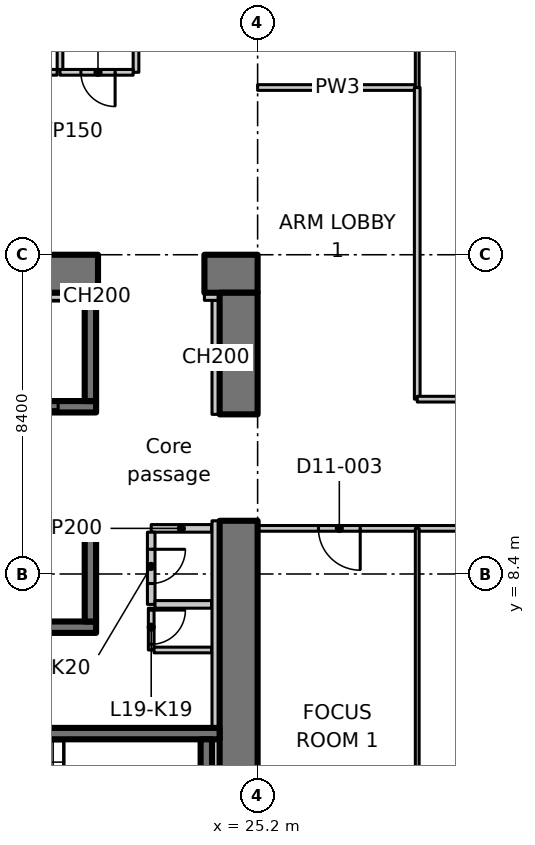
"""IFC4 building model, lengths in metres.
Left out: names, types, materials, properties, quantities, classifications, styles, units other than length and angle.
Written with IfcOpenShell. Run it as: python <this file> out.ifc"""

import sys

from ifc_helpers import new_model, si_unit, direction, frame, frame_2d, origin, place, context, subcontext, project, spatial, polyline, rectangle, outline, extrude, element, fill, save


model = new_model("IFC4")
c1 = context("Model", 3, precision=1e-05, world=origin(), true_north=direction((0.0, 1.0)))
c2 = subcontext(c1, "Body", "Model", "MODEL_VIEW")
j1 = project(units=[si_unit("LENGTHUNIT", "METRE"), si_unit("PLANEANGLEUNIT", "RADIAN")], contexts=[c1])
p1 = place(None, origin())
s1 = spatial("IfcSite", under=j1, at=p1, CompositionType="ELEMENT")
p2 = place(p1, origin())
s2 = spatial("IfcBuilding", under=s1, at=p2, CompositionType="ELEMENT")
p3 = place(p2, frame((0.0, 0.0, 83.3)))
s3 = spatial("IfcBuildingStorey", under=s2, at=p3, CompositionType="ELEMENT", Elevation=83.3)
p4 = place(p3, frame((-1.1, 16.3, 0.0), z_axis=(0.0, 0.0, 1.0), x_axis=(1.0, 0.0, 0.0)))
e1 = element("IfcWall", 1, at=p4, inside=s3, PredefinedType="SHEAR", context=c2, shape_type="SweptSolid", body=[
    extrude(rectangle(XDim=22.1, YDim=1.0, at=frame_2d((11.05, 0.0))), origin(), (0.0, 0.0, 1.0), 3.3),
])
p5 = place(p4, frame((3.15, 0.0, 0.0)))
e2 = element("IfcOpeningElement", 2, at=p5, cuts=e1, PredefinedType="OPENING", context=c2, shape_type="SweptSolid", body=[
    extrude(rectangle(XDim=1.1, YDim=2.3, at=frame_2d((0.55, 1.15))), frame((0.0, 0.51, 0.0), z_axis=(0.0, -1.0, 0.0), x_axis=(1.0, 0.0, 0.0)), (0.0, 0.0, 1.0), 1.02),
])
p6 = place(p3, frame((23.8, 16.3, 0.0), z_axis=(0.0, 0.0, 1.0), x_axis=(1.0, 0.0, 0.0)))
e3 = element("IfcWall", 3, at=p6, inside=s3, PredefinedType="SHEAR", context=c2, shape_type="SweptSolid", body=[
    extrude(rectangle(XDim=1.4, YDim=1.0, at=frame_2d((0.7, 0.0))), origin(), (0.0, 0.0, 1.0), 3.3),
])
p7 = place(p3, frame((24.7, 1.0, 0.0), z_axis=(0.0, 0.0, 1.0), x_axis=(0.0, 1.0, 0.0)))
e4 = element("IfcWall", 4, at=p7, inside=s3, PredefinedType="SHEAR", context=c2, shape_type="SweptSolid", body=[
    extrude(rectangle(XDim=8.8, YDim=1.0, at=frame_2d((4.4, 0.0))), origin(), (0.0, 0.0, 1.0), 3.3),
])
p8 = place(p3, frame((24.7, 12.6, 0.0), z_axis=(0.0, 0.0, 1.0), x_axis=(0.0, 1.0, 0.0)))
e5 = element("IfcWall", 5, at=p8, inside=s3, PredefinedType="SHEAR", context=c2, shape_type="SweptSolid", body=[
    extrude(rectangle(XDim=3.2, YDim=1.0, at=frame_2d((1.6, 0.0))), origin(), (0.0, 0.0, 1.0), 3.3),
])
p9 = place(p3, frame((24.1, 12.6, 0.0), z_axis=(0.0, 0.0, 1.0), x_axis=(0.0, 1.0, 0.0)))
e6 = element("IfcWall", 6, at=p9, inside=s3, PredefinedType="PARTITIONING", context=c2, shape_type="SweptSolid", body=[
    extrude(rectangle(XDim=3.0, YDim=0.2, at=frame_2d((1.5, 0.0))), origin(), (0.0, 0.0, 1.0), 3.3),
])
p10 = place(p3, frame((23.8, 15.7, 0.0), z_axis=(0.0, 0.0, 1.0), x_axis=(1.0, 0.0, 0.0)))
e7 = element("IfcWall", 7, at=p10, inside=s3, PredefinedType="PARTITIONING", context=c2, shape_type="SweptSolid", body=[
    extrude(rectangle(XDim=0.4, YDim=0.2, at=frame_2d((0.2, 0.0))), origin(), (0.0, 0.0, 1.0), 3.3),
])
p11 = place(p3, frame((1.0, 7.0, 0.0), z_axis=(0.0, 0.0, 1.0), x_axis=(1.0, 0.0, 0.0)))
e8 = element("IfcWall", 8, at=p11, inside=s3, PredefinedType="SHEAR", context=c2, shape_type="SweptSolid", body=[
    extrude(rectangle(XDim=19.95, YDim=0.3, at=frame_2d((9.975, 0.0))), origin(), (0.0, 0.0, 1.0), 3.3),
])
p12 = place(p3, frame((1.0, 9.6, 0.0), z_axis=(0.0, 0.0, 1.0), x_axis=(1.0, 0.0, 0.0)))
e9 = element("IfcWall", 9, at=p12, inside=s3, PredefinedType="SHEAR", context=c2, shape_type="SweptSolid", body=[
    extrude(rectangle(XDim=19.95, YDim=0.3, at=frame_2d((9.975, 0.0))), origin(), (0.0, 0.0, 1.0), 3.3),
])
p13 = place(p12, frame((1.05, 0.0, 0.0)))
e10 = element("IfcOpeningElement", 10, at=p13, cuts=e9, PredefinedType="OPENING", context=c2, shape_type="SweptSolid", body=[
    extrude(rectangle(XDim=1.1, YDim=2.3, at=frame_2d((0.55, 1.15))), frame((0.0, 0.16, 0.0), z_axis=(0.0, -1.0, 0.0), x_axis=(1.0, 0.0, 0.0)), (0.0, 0.0, 1.0), 0.32),
])
p14 = place(p12, frame((3.85, 0.0, 0.0)))
e11 = element("IfcOpeningElement", 11, at=p14, cuts=e9, PredefinedType="OPENING", context=c2, shape_type="SweptSolid", body=[
    extrude(rectangle(XDim=1.1, YDim=2.3, at=frame_2d((0.55, 1.15))), frame((0.0, 0.16, 0.0), z_axis=(0.0, -1.0, 0.0), x_axis=(1.0, 0.0, 0.0)), (0.0, 0.0, 1.0), 0.32),
])
p15 = place(p12, frame((6.65, 0.0, 0.0)))
e12 = element("IfcOpeningElement", 12, at=p15, cuts=e9, PredefinedType="OPENING", context=c2, shape_type="SweptSolid", body=[
    extrude(rectangle(XDim=1.1, YDim=2.3, at=frame_2d((0.55, 1.15))), frame((0.0, 0.16, 0.0), z_axis=(0.0, -1.0, 0.0), x_axis=(1.0, 0.0, 0.0)), (0.0, 0.0, 1.0), 0.32),
])
p16 = place(p12, frame((9.45, 0.0, 0.0)))
e13 = element("IfcOpeningElement", 13, at=p16, cuts=e9, PredefinedType="OPENING", context=c2, shape_type="SweptSolid", body=[
    extrude(rectangle(XDim=1.1, YDim=2.3, at=frame_2d((0.55, 1.15))), frame((0.0, 0.16, 0.0), z_axis=(0.0, -1.0, 0.0), x_axis=(1.0, 0.0, 0.0)), (0.0, 0.0, 1.0), 0.32),
])
p17 = place(p12, frame((12.25, 0.0, 0.0)))
e14 = element("IfcOpeningElement", 14, at=p17, cuts=e9, PredefinedType="OPENING", context=c2, shape_type="SweptSolid", body=[
    extrude(rectangle(XDim=1.1, YDim=2.3, at=frame_2d((0.55, 1.15))), frame((0.0, 0.16, 0.0), z_axis=(0.0, -1.0, 0.0), x_axis=(1.0, 0.0, 0.0)), (0.0, 0.0, 1.0), 0.32),
])
p18 = place(p12, frame((15.05, 0.0, 0.0)))
e15 = element("IfcOpeningElement", 15, at=p18, cuts=e9, PredefinedType="OPENING", context=c2, shape_type="SweptSolid", body=[
    extrude(rectangle(XDim=1.1, YDim=2.3, at=frame_2d((0.55, 1.15))), frame((0.0, 0.16, 0.0), z_axis=(0.0, -1.0, 0.0), x_axis=(1.0, 0.0, 0.0)), (0.0, 0.0, 1.0), 0.32),
])
p19 = place(p3, frame((20.8, 7.15, 0.0), z_axis=(0.0, 0.0, 1.0), x_axis=(0.0, 1.0, 0.0)))
e16 = element("IfcWall", 16, at=p19, inside=s3, PredefinedType="SHEAR", context=c2, shape_type="SweptSolid", body=[
    extrude(rectangle(XDim=2.3, YDim=0.3, at=frame_2d((1.15, 0.0))), origin(), (0.0, 0.0, 1.0), 3.3),
])
p20 = place(p3, frame((15.05, 12.8, 0.0), z_axis=(0.0, 0.0, 1.0), x_axis=(1.0, 0.0, 0.0)))
e17 = element("IfcWall", 17, at=p20, inside=s3, PredefinedType="SHEAR", context=c2, shape_type="SweptSolid", body=[
    extrude(rectangle(XDim=5.9, YDim=0.3, at=frame_2d((2.95, 0.0))), origin(), (0.0, 0.0, 1.0), 3.3),
])
p21 = place(p20, frame((3.8, 0.0, 0.0)))
e18 = element("IfcOpeningElement", 18, at=p21, cuts=e17, PredefinedType="OPENING", context=c2, shape_type="SweptSolid", body=[
    extrude(rectangle(XDim=1.1, YDim=2.3, at=frame_2d((0.55, 1.15))), frame((0.0, 0.16, 0.0), z_axis=(0.0, -1.0, 0.0), x_axis=(1.0, 0.0, 0.0)), (0.0, 0.0, 1.0), 0.32),
])
p22 = place(p3, frame((20.8, 12.95, 0.0), z_axis=(0.0, 0.0, 1.0), x_axis=(0.0, 1.0, 0.0)))
e19 = element("IfcWall", 19, at=p22, inside=s3, PredefinedType="SHEAR", context=c2, shape_type="SweptSolid", body=[
    extrude(rectangle(XDim=2.85, YDim=0.3, at=frame_2d((1.425, 0.0))), origin(), (0.0, 0.0, 1.0), 3.3),
])
p23 = place(p3, frame((15.8, 4.2, 0.0), z_axis=(0.0, 0.0, 1.0), x_axis=(1.0, 0.0, 0.0)))
e20 = element("IfcWall", 20, at=p23, inside=s3, PredefinedType="SHEAR", context=c2, shape_type="SweptSolid", body=[
    extrude(rectangle(XDim=8.4, YDim=0.3, at=frame_2d((4.2, 0.0))), origin(), (0.0, 0.0, 1.0), 3.3),
])
p24 = place(p23, frame((0.4, 0.0, 0.0)))
e21 = element("IfcOpeningElement", 21, at=p24, cuts=e20, PredefinedType="OPENING", context=c2, shape_type="SweptSolid", body=[
    extrude(rectangle(XDim=1.0, YDim=2.1, at=frame_2d((0.5, 1.05))), frame((0.0, 0.16, 0.0), z_axis=(0.0, -1.0, 0.0), x_axis=(1.0, 0.0, 0.0)), (0.0, 0.0, 1.0), 0.32),
])
p25 = place(p3, frame((23.85, 1.5, 0.0), z_axis=(0.0, 0.0, 1.0), x_axis=(0.0, 1.0, 0.0)))
e22 = element("IfcWall", 22, at=p25, inside=s3, PredefinedType="SHEAR", context=c2, shape_type="SweptSolid", body=[
    extrude(rectangle(XDim=2.55, YDim=0.3, at=frame_2d((1.275, 0.0))), origin(), (0.0, 0.0, 1.0), 3.3),
])
p26 = place(p3, frame((23.988, 9.6, 0.0), z_axis=(0.0, 0.0, 1.0), x_axis=(-1.0, 0.0, 0.0)))
e23 = element("IfcWall", 23, at=p26, inside=s3, PredefinedType="PARTITIONING", context=c2, shape_type="SweptSolid", body=[
    extrude(rectangle(XDim=1.588, YDim=0.2, at=frame_2d((0.794, 0.0))), origin(), (0.0, 0.0, 1.0), 3.3),
])
p27 = place(p3, frame((22.4, 9.5, 0.0), z_axis=(0.0, 0.0, 1.0), x_axis=(0.0, -1.0, 0.0)))
e24 = element("IfcWall", 24, at=p27, inside=s3, PredefinedType="PARTITIONING", context=c2, shape_type="SweptSolid", body=[
    extrude(rectangle(XDim=1.9, YDim=0.2, at=frame_2d((0.95, 0.0))), origin(), (0.0, 0.0, 1.0), 3.3),
])
p28 = place(p27, frame((0.45, 0.0, 0.0)))
e25 = element("IfcOpeningElement", 25, at=p28, cuts=e24, PredefinedType="OPENING", context=c2, shape_type="SweptSolid", body=[
    extrude(rectangle(XDim=0.9, YDim=2.1, at=frame_2d((0.45, 1.05))), frame((0.0, 0.11, 0.0), z_axis=(0.0, -1.0, 0.0), x_axis=(1.0, 0.0, 0.0)), (0.0, 0.0, 1.0), 0.22),
])
p29 = place(p3, frame((22.5, 7.6, 0.0), z_axis=(0.0, 0.0, 1.0), x_axis=(1.0, 0.0, 0.0)))
e26 = element("IfcWall", 26, at=p29, inside=s3, PredefinedType="PARTITIONING", context=c2, shape_type="SweptSolid", body=[
    extrude(rectangle(XDim=1.488, YDim=0.2, at=frame_2d((0.744, 0.0))), origin(), (0.0, 0.0, 1.0), 3.3),
])
p30 = place(p3, frame((22.0, 23.925, 0.0), z_axis=(0.0, 0.0, 1.0), x_axis=(0.0, -1.0, 0.0)))
e27 = element("IfcWall", 27, at=p30, inside=s3, PredefinedType="PARTITIONING", context=c2, shape_type="SweptSolid", body=[
    extrude(rectangle(XDim=2.325, YDim=0.15, at=frame_2d((1.163, 0.0))), origin(), (0.0, 0.0, 1.0), 3.3),
])
p31 = place(p3, frame((21.925, 21.6, 0.0), z_axis=(0.0, 0.0, 1.0), x_axis=(-1.0, 0.0, 0.0)))
e28 = element("IfcWall", 28, at=p31, inside=s3, PredefinedType="PARTITIONING", context=c2, shape_type="SweptSolid", body=[
    extrude(rectangle(XDim=1.925, YDim=0.15, at=frame_2d((0.962, 0.0))), origin(), (0.0, 0.0, 1.0), 3.3),
])
p32 = place(p31, frame((0.475, 0.0, 0.0)))
e29 = element("IfcOpeningElement", 29, at=p32, cuts=e28, PredefinedType="OPENING", context=c2, shape_type="SweptSolid", body=[
    extrude(rectangle(XDim=0.9, YDim=2.1, at=frame_2d((0.45, 1.05))), frame((0.0, 0.085, 0.0), z_axis=(0.0, -1.0, 0.0), x_axis=(1.0, 0.0, 0.0)), (0.0, 0.0, 1.0), 0.17),
])
p33 = place(p3, frame((20.0, 21.675, 0.0), z_axis=(0.0, 0.0, 1.0), x_axis=(0.0, 1.0, 0.0)))
e30 = element("IfcWall", 30, at=p33, inside=s3, PredefinedType="PARTITIONING", context=c2, shape_type="SweptSolid", body=[
    extrude(rectangle(XDim=2.25, YDim=0.15, at=frame_2d((1.125, 0.0))), origin(), (0.0, 0.0, 1.0), 3.3),
])
p34 = place(p3, frame((19.925, 21.6, 0.0), z_axis=(0.0, 0.0, 1.0), x_axis=(-1.0, 0.0, 0.0)))
e31 = element("IfcWall", 31, at=p34, inside=s3, PredefinedType="PARTITIONING", context=c2, shape_type="SweptSolid", body=[
    extrude(rectangle(XDim=2.325, YDim=0.15, at=frame_2d((1.163, 0.0))), origin(), (0.0, 0.0, 1.0), 3.3),
])
p35 = place(p34, frame((0.675, 0.0, 0.0)))
e32 = element("IfcOpeningElement", 32, at=p35, cuts=e31, PredefinedType="OPENING", context=c2, shape_type="SweptSolid", body=[
    extrude(rectangle(XDim=0.9, YDim=2.1, at=frame_2d((0.45, 1.05))), frame((0.0, 0.085, 0.0), z_axis=(0.0, -1.0, 0.0), x_axis=(1.0, 0.0, 0.0)), (0.0, 0.0, 1.0), 0.17),
])
p36 = place(p3, frame((22.4, 7.5, 0.0), z_axis=(0.0, 0.0, 1.0), x_axis=(0.0, -1.0, 0.0)))
e33 = element("IfcWall", 33, at=p36, inside=s3, PredefinedType="PARTITIONING", context=c2, shape_type="SweptSolid", body=[
    extrude(rectangle(XDim=1.1, YDim=0.15, at=frame_2d((0.55, 0.0))), origin(), (0.0, 0.0, 1.0), 3.3),
])
p37 = place(p36, frame((0.05, 0.0, 0.0)))
e34 = element("IfcOpeningElement", 34, at=p37, cuts=e33, PredefinedType="OPENING", context=c2, shape_type="SweptSolid", body=[
    extrude(rectangle(XDim=0.9, YDim=2.1, at=frame_2d((0.45, 1.05))), frame((0.0, 0.085, 0.0), z_axis=(0.0, -1.0, 0.0), x_axis=(1.0, 0.0, 0.0)), (0.0, 0.0, 1.0), 0.17),
])
p38 = place(p3, frame((22.475, 6.4, 0.0), z_axis=(0.0, 0.0, 1.0), x_axis=(1.0, 0.0, 0.0)))
e35 = element("IfcWall", 35, at=p38, inside=s3, PredefinedType="PARTITIONING", context=c2, shape_type="SweptSolid", body=[
    extrude(rectangle(XDim=1.513, YDim=0.15, at=frame_2d((0.756, 0.0))), origin(), (0.0, 0.0, 1.0), 3.3),
])
p39 = place(p3, frame((18.15, 15.7, 0.0), z_axis=(0.0, 0.0, 1.0), x_axis=(1.0, 0.0, 0.0)))
e36 = element("IfcWall", 36, at=p39, inside=s3, PredefinedType="PARTITIONING", context=c2, shape_type="SweptSolid", body=[
    extrude(rectangle(XDim=2.5, YDim=0.2, at=frame_2d((1.25, 0.0))), origin(), (0.0, 0.0, 1.0), 3.3),
])
p40 = place(p3, frame((20.95, 15.7, 0.0), z_axis=(0.0, 0.0, 1.0), x_axis=(1.0, 0.0, 0.0)))
e37 = element("IfcWall", 37, at=p40, inside=s3, PredefinedType="PARTITIONING", context=c2, shape_type="SweptSolid", body=[
    extrude(rectangle(XDim=0.05, YDim=0.2, at=frame_2d((0.025, 0.0))), origin(), (0.0, 0.0, 1.0), 3.3),
])
p41 = place(p3, frame((24.1, 1.5, 0.0), z_axis=(0.0, 0.0, 1.0), x_axis=(0.0, 1.0, 0.0)))
e38 = element("IfcWall", 38, at=p41, inside=s3, PredefinedType="PARTITIONING", context=c2, shape_type="SweptSolid", body=[
    extrude(rectangle(XDim=2.55, YDim=0.2, at=frame_2d((1.275, 0.0))), origin(), (0.0, 0.0, 1.0), 3.3),
])
p42 = place(p3, frame((24.1, 4.35, 0.0), z_axis=(0.0, 0.0, 1.0), x_axis=(0.0, 1.0, 0.0)))
e39 = element("IfcWall", 39, at=p42, inside=s3, PredefinedType="PARTITIONING", context=c2, shape_type="SweptSolid", body=[
    extrude(rectangle(XDim=5.45, YDim=0.2, at=frame_2d((2.725, 0.0))), origin(), (0.0, 0.0, 1.0), 3.3),
])
p43 = place(p3, frame((25.2, 21.2, 0.0), z_axis=(0.0, 0.0, 1.0), x_axis=(1.0, 0.0, 0.0)))
e40 = element("IfcWall", 40, at=p43, inside=s3, PredefinedType="PARTITIONING", context=c2, shape_type="SweptSolid", body=[
    extrude(rectangle(XDim=4.2, YDim=0.15, at=frame_2d((2.1, 0.0))), origin(), (0.0, 0.0, 1.0), 3.28),
])
p44 = place(p3, frame((29.4, 9.6, 0.0), z_axis=(0.0, 0.0, 1.0), x_axis=(-1.0, 0.0, 0.0)))
e41 = element("IfcWall", 41, at=p44, inside=s3, PredefinedType="PARTITIONING", context=c2, shape_type="SweptSolid", body=[
    extrude(rectangle(XDim=4.2, YDim=0.15, at=frame_2d((2.1, 0.0))), origin(), (0.0, 0.0, 1.0), 3.28),
])
p45 = place(p44, frame((1.5, 0.0, 0.0)))
e42 = element("IfcOpeningElement", 42, at=p45, cuts=e41, PredefinedType="OPENING", context=c2, shape_type="SweptSolid", body=[
    extrude(rectangle(XDim=1.1, YDim=2.1, at=frame_2d((0.55, 1.05))), frame((0.0, 0.085, 0.0), z_axis=(0.0, -1.0, 0.0), x_axis=(1.0, 0.0, 0.0)), (0.0, 0.0, 1.0), 0.17),
])
p46 = place(p3, frame((29.4, 21.2, 0.0), z_axis=(0.0, 0.0, 1.0), x_axis=(0.0, -1.0, 0.0)))
e43 = element("IfcWall", 43, at=p46, inside=s3, PredefinedType="PARTITIONING", context=c2, shape_type="SweptSolid", body=[
    extrude(rectangle(XDim=8.2, YDim=0.15, at=frame_2d((4.1, 0.0))), origin(), (0.0, 0.0, 1.0), 3.28),
])
p47 = place(p3, frame((29.4, 27.511, 0.0), z_axis=(0.0, 0.0, 1.0), x_axis=(0.0, -1.0, 0.0)))
e44 = element("IfcWall", 44, at=p47, inside=s3, PredefinedType="PARTITIONING", context=c2, shape_type="SweptSolid", body=[
    extrude(outline(polyline([(0.0, 0.0), (6.311, 0.0), (6.311, 3.28), (2.761, 3.28), (2.759, 2.93), (1.863, 2.93), (1.861, 3.28), (0.236, 3.28), (0.0, 3.28), (0.0, 0.0)])), frame((0.0, 0.05, 0.0), z_axis=(0.0, -1.0, 0.0), x_axis=(1.0, 0.0, 0.0)), (0.0, 0.0, 1.0), 0.1),
])
p48 = place(p3, frame((46.2, 9.6, 0.0), z_axis=(0.0, 0.0, 1.0), x_axis=(-1.0, 0.0, 0.0)))
e45 = element("IfcWall", 45, at=p48, inside=s3, PredefinedType="PARTITIONING", context=c2, shape_type="SweptSolid", body=[
    extrude(rectangle(XDim=16.8, YDim=0.15, at=frame_2d((8.4, 0.0))), origin(), (0.0, 0.0, 1.0), 3.28),
])
p49 = place(p48, frame((7.5, 0.0, 0.0)))
e46 = element("IfcOpeningElement", 46, at=p49, cuts=e45, PredefinedType="OPENING", context=c2, shape_type="SweptSolid", body=[
    extrude(rectangle(XDim=2.0, YDim=2.4, at=frame_2d((1.0, 1.2))), frame((0.0, 0.085, 0.0), z_axis=(0.0, -1.0, 0.0), x_axis=(1.0, 0.0, 0.0)), (0.0, 0.0, 1.0), 0.17),
])
p50 = place(p3, frame((29.4, 13.0, 0.0), z_axis=(0.0, 0.0, 1.0), x_axis=(1.0, 0.0, 0.0)))
e47 = element("IfcWall", 47, at=p50, inside=s3, PredefinedType="PARTITIONING", context=c2, shape_type="SweptSolid", body=[
    extrude(rectangle(XDim=8.4, YDim=0.15, at=frame_2d((4.2, 0.0))), origin(), (0.0, 0.0, 1.0), 3.28),
])
p51 = place(p50, frame((3.3, 0.0, 0.0)))
e48 = element("IfcOpeningElement", 48, at=p51, cuts=e47, PredefinedType="OPENING", context=c2, shape_type="SweptSolid", body=[
    extrude(rectangle(XDim=1.8, YDim=2.1, at=frame_2d((0.9, 1.05))), frame((0.0, 0.085, 0.0), z_axis=(0.0, -1.0, 0.0), x_axis=(1.0, 0.0, 0.0)), (0.0, 0.0, 1.0), 0.17),
])
p52 = place(p3, frame((29.4, 9.6, 0.0), z_axis=(0.0, 0.0, 1.0), x_axis=(0.0, -1.0, 0.0)))
e49 = element("IfcWall", 49, at=p52, inside=s3, PredefinedType="PARTITIONING", context=c2, shape_type="SweptSolid", body=[
    extrude(outline(polyline([(0.0, 0.0), (10.774, 0.0), (10.774, 3.28), (10.7, 3.28), (10.05, 3.28), (10.048, 2.93), (9.152, 2.93), (9.15, 3.28), (0.0, 3.28), (0.0, 0.0)])), frame((0.0, 0.05, 0.0), z_axis=(0.0, -1.0, 0.0), x_axis=(1.0, 0.0, 0.0)), (0.0, 0.0, 1.0), 0.1),
])
p53 = place(p21, origin())
e50 = element("IfcDoor", 50, at=p53, inside=s3, OperationType="SLIDING_TO_LEFT", PredefinedType="DOOR", context=c2, shape_type="SweptSolid", body=[
    extrude(rectangle(XDim=1.1, YDim=2.3, at=frame_2d((0.55, 1.15))), frame((0.0, 0.025, 0.0), z_axis=(0.0, -1.0, 0.0), x_axis=(1.0, 0.0, 0.0)), (0.0, 0.0, 1.0), 0.05),
])
fill(e18, e50)
p54 = place(p37, origin())
e51 = element("IfcDoor", 51, at=p54, inside=s3, OperationType="SINGLE_SWING_LEFT", PredefinedType="DOOR", context=c2, shape_type="SweptSolid", body=[
    extrude(rectangle(XDim=0.9, YDim=2.1, at=frame_2d((0.45, 1.05))), frame((0.0, 0.025, 0.0), z_axis=(0.0, -1.0, 0.0), x_axis=(1.0, 0.0, 0.0)), (0.0, 0.0, 1.0), 0.05),
])
fill(e34, e51)
p55 = place(p28, origin())
e52 = element("IfcDoor", 52, at=p55, inside=s3, OperationType="SINGLE_SWING_RIGHT", PredefinedType="DOOR", context=c2, shape_type="SweptSolid", body=[
    extrude(rectangle(XDim=0.9, YDim=2.1, at=frame_2d((0.45, 1.05))), frame((0.0, 0.025, 0.0), z_axis=(0.0, -1.0, 0.0), x_axis=(1.0, 0.0, 0.0)), (0.0, 0.0, 1.0), 0.05),
])
fill(e25, e52)
p56 = place(p32, origin())
e53 = element("IfcDoor", 53, at=p56, inside=s3, OperationType="SINGLE_SWING_RIGHT", PredefinedType="DOOR", context=c2, shape_type="SweptSolid", body=[
    extrude(rectangle(XDim=0.9, YDim=2.1, at=frame_2d((0.45, 1.05))), frame((0.0, 0.025, 0.0), z_axis=(0.0, -1.0, 0.0), x_axis=(1.0, 0.0, 0.0)), (0.0, 0.0, 1.0), 0.05),
])
fill(e29, e53)
p57 = place(p45, origin())
e54 = element("IfcDoor", 54, at=p57, inside=s3, OperationType="SINGLE_SWING_LEFT", PredefinedType="DOOR", context=c2, shape_type="SweptSolid", body=[
    extrude(rectangle(XDim=1.1, YDim=2.1, at=frame_2d((0.55, 1.05))), frame((0.0, 0.025, 0.0), z_axis=(0.0, -1.0, 0.0), x_axis=(1.0, 0.0, 0.0)), (0.0, 0.0, 1.0), 0.05),
])
fill(e42, e54)
save(model, sys.argv[1])
